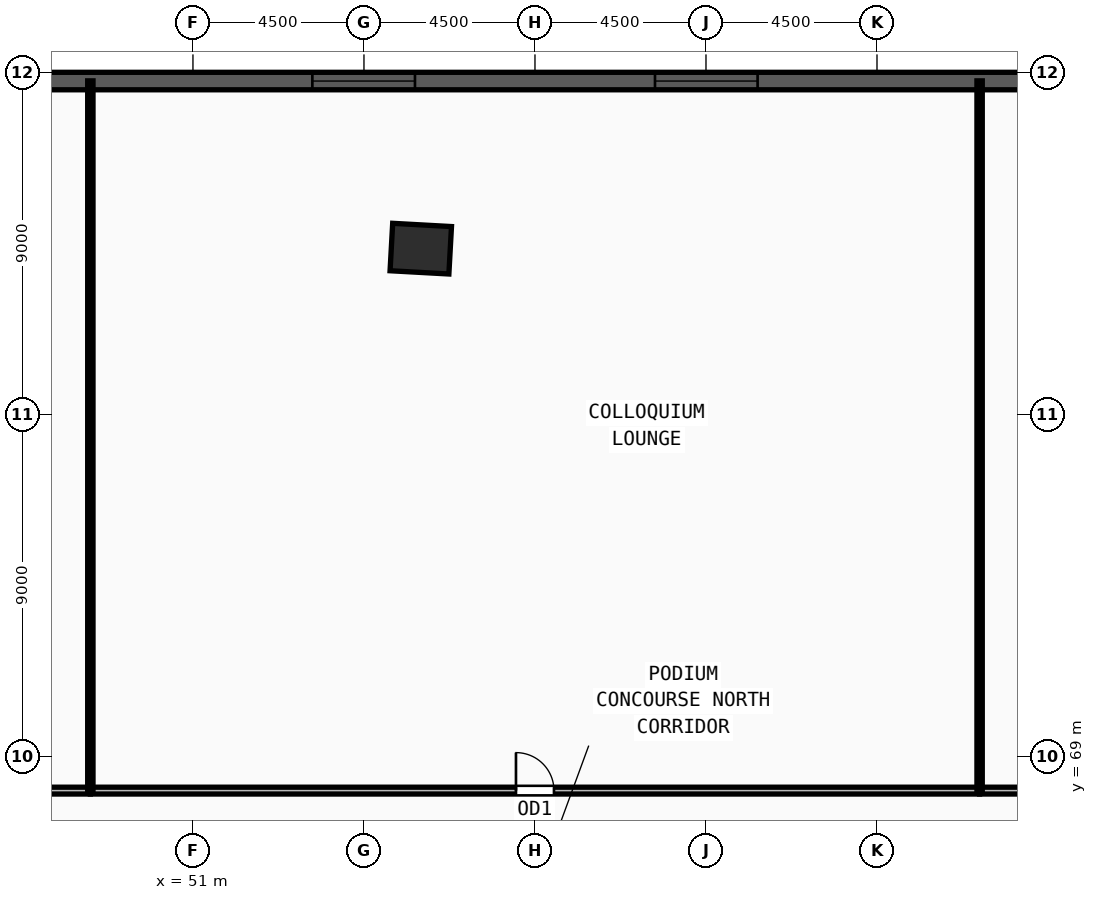
"""IFC4 building model, lengths in metres.
Left out: names, types, materials, properties, quantities, classifications, styles, units other than length and angle.
Written with IfcOpenShell. Run it as: python <this file> out.ifc"""

import sys

from ifc_helpers import new_model, si_unit, direction, frame, frame_2d, origin, origin_2d, place, context, subcontext, project, spatial, rectangle, extrude, source, transform, mapped, element, fill, save


model = new_model("IFC4")
c1 = context("Model", 3, precision=1e-05, world=origin(), true_north=direction((0.0, 1.0)))
c2 = subcontext(c1, "Body", "Model", "MODEL_VIEW")
j1 = project(units=[si_unit("LENGTHUNIT", "METRE"), si_unit("PLANEANGLEUNIT", "RADIAN")], contexts=[c1])
p1 = place(None, origin())
s1 = spatial("IfcSite", under=j1, at=p1, CompositionType="ELEMENT")
p2 = place(p1, origin())
s2 = spatial("IfcBuilding", under=s1, at=p2, CompositionType="ELEMENT")
p3 = place(p2, frame((0.0, 0.0, 14.4)))
s3 = spatial("IfcBuildingStorey", under=s2, at=p3, CompositionType="ELEMENT", Elevation=14.4)
m1 = source(origin(), c2, "Body", "SweptSolid", [
    extrude(rectangle(XDim=1.55, YDim=1.25, at=origin_2d()), origin(), (0.0, 0.0, 1.0), 4.5),
])
p4 = place(p3, frame((56.995, 82.36, 0.0), z_axis=(0.0, 0.0, 1.0), x_axis=(-0.998479491627, 0.055124448298, 0.0)))
e1 = element("IfcColumn", 1, at=p4, inside=s3, PredefinedType="COLUMN", context=c2, shape_type="MappedRepresentation", body=[
    mapped(m1, transform((0.0, 0.0, 0.0), x_axis=(1.0, 0.0, 0.0), y_axis=(0.0, 1.0, 0.0), z_axis=(0.0, 0.0, 1.0), scale=1.0)),
])
p5 = place(p3, frame((100.57, 86.77, 0.0), z_axis=(0.0, 0.0, 1.0), x_axis=(-1.0, 0.0, 0.0)))
e2 = element("IfcWall", 2, at=p5, inside=s3, PredefinedType="SOLIDWALL", context=c2, shape_type="SweptSolid", body=[
    extrude(rectangle(XDim=81.14, YDim=0.46, at=frame_2d((40.57, 0.0))), origin(), (0.0, 0.0, 1.0), 4.25),
])
m2 = source(origin(), c2, "Body", "SweptSolid", [
    extrude(rectangle(XDim=2.7, YDim=2.35, at=frame_2d((1.35, 1.175))), frame((0.0, 0.24, 0.0), z_axis=(0.0, -1.0, 0.0), x_axis=(1.0, 0.0, 0.0)), (0.0, 0.0, 1.0), 0.48),
])
p6 = place(p5, frame((7.666, 0.0, 0.55)))
e3 = element("IfcOpeningElement", 3, at=p6, cuts=e2, PredefinedType="OPENING", context=c2, shape_type="MappedRepresentation", body=[
    mapped(m2, transform((0.0, 0.0, 0.0), x_axis=(1.0, 0.0, 0.0), y_axis=(0.0, 1.0, 0.0), z_axis=(0.0, 0.0, 1.0), scale=1.0)),
])
p7 = place(p5, frame((16.681, 0.0, 0.55)))
e4 = element("IfcOpeningElement", 4, at=p7, cuts=e2, PredefinedType="OPENING", context=c2, shape_type="MappedRepresentation", body=[
    mapped(m2, transform((0.0, 0.0, 0.0), x_axis=(1.0, 0.0, 0.0), y_axis=(0.0, 1.0, 0.0), z_axis=(0.0, 0.0, 1.0), scale=1.0)),
])
p8 = place(p5, frame((34.712, 0.0, 0.55)))
e5 = element("IfcOpeningElement", 5, at=p8, cuts=e2, PredefinedType="OPENING", context=c2, shape_type="MappedRepresentation", body=[
    mapped(m2, transform((0.0, 0.0, 0.0), x_axis=(1.0, 0.0, 0.0), y_axis=(0.0, 1.0, 0.0), z_axis=(0.0, 0.0, 1.0), scale=1.0)),
])
p9 = place(p5, frame((43.728, 0.0, 0.55)))
e6 = element("IfcOpeningElement", 6, at=p9, cuts=e2, PredefinedType="OPENING", context=c2, shape_type="MappedRepresentation", body=[
    mapped(m2, transform((0.0, 0.0, 0.0), x_axis=(1.0, 0.0, 0.0), y_axis=(0.0, 1.0, 0.0), z_axis=(0.0, 0.0, 1.0), scale=1.0)),
])
p10 = place(p5, frame((61.759, 0.0, 0.55)))
e7 = element("IfcOpeningElement", 7, at=p10, cuts=e2, PredefinedType="OPENING", context=c2, shape_type="MappedRepresentation", body=[
    mapped(m2, transform((0.0, 0.0, 0.0), x_axis=(1.0, 0.0, 0.0), y_axis=(0.0, 1.0, 0.0), z_axis=(0.0, 0.0, 1.0), scale=1.0)),
])
p11 = place(p5, frame((70.774, 0.0, 0.55)))
e8 = element("IfcOpeningElement", 8, at=p11, cuts=e2, PredefinedType="OPENING", context=c2, shape_type="MappedRepresentation", body=[
    mapped(m2, transform((0.0, 0.0, 0.0), x_axis=(1.0, 0.0, 0.0), y_axis=(0.0, 1.0, 0.0), z_axis=(0.0, 0.0, 1.0), scale=1.0)),
])
p12 = place(p3, frame((48.3, 68.1, 0.0), z_axis=(0.0, 0.0, 1.0), x_axis=(1.0, 0.0, 0.0)))
e9 = element("IfcWall", 9, at=p12, inside=s3, PredefinedType="PARTITIONING", context=c2, shape_type="SweptSolid", body=[
    extrude(rectangle(XDim=23.4, YDim=0.18, at=frame_2d((11.7, 0.0))), origin(), (0.0, 0.0, 1.0), 4.25),
])
m3 = source(origin(), c2, "Body", "SweptSolid", [
    extrude(rectangle(XDim=1.0, YDim=2.2, at=frame_2d((0.5, 1.1))), frame((0.0, 0.1, 0.0), z_axis=(0.0, -1.0, 0.0), x_axis=(1.0, 0.0, 0.0)), (0.0, 0.0, 1.0), 0.2),
])
p13 = place(p12, frame((11.2, 0.0, 0.0)))
e10 = element("IfcOpeningElement", 10, at=p13, cuts=e9, PredefinedType="OPENING", context=c2, shape_type="MappedRepresentation", body=[
    mapped(m3, transform((0.0, 0.0, 0.0), x_axis=(1.0, 0.0, 0.0), y_axis=(0.0, 1.0, 0.0), z_axis=(0.0, 0.0, 1.0), scale=1.0)),
])
for number, where, z_axis, x_axis in (
    (11, (44.42, 68.1, 0.0), (0.0, 0.0, 1.0), (1.0, 0.0, 0.0)),
    (12, (71.7, 68.1, 0.0), (0.0, 0.0, 1.0), (1.0, 0.0, 0.0)),
):
    element("IfcWall", number, at=place(p3, frame(where, z_axis=z_axis, x_axis=x_axis)), inside=s3, PredefinedType="PARTITIONING", context=c2, shape_type="SweptSolid", body=[
        extrude(rectangle(XDim=3.88, YDim=0.18, at=frame_2d((1.94, 0.0))), origin(), (0.0, 0.0, 1.0), 4.25),
    ])
for number, where, z_axis, x_axis in (
    (13, (48.3, 68.1, 0.0), (0.0, 0.0, 1.0), (0.0, 1.0, 0.0)),
    (14, (71.7, 68.1, 0.0), (0.0, 0.0, 1.0), (0.0, 1.0, 0.0)),
):
    element("IfcWall", number, at=place(p3, frame(where, z_axis=z_axis, x_axis=x_axis)), inside=s3, PredefinedType="PARTITIONING", context=c2, shape_type="SweptSolid", body=[
        extrude(rectangle(XDim=18.675, YDim=0.14, at=frame_2d((9.337, 0.0))), origin(), (0.0, 0.0, 1.0), 4.25),
    ])
m4 = source(origin(), c2, "Body", "SweptSolid", [
    extrude(rectangle(XDim=2.7, YDim=2.35, at=frame_2d((1.35, 1.175))), frame((0.0, 0.03, 0.0), z_axis=(0.0, -1.0, 0.0), x_axis=(1.0, 0.0, 0.0)), (0.0, 0.0, 1.0), 0.06),
])
p14 = place(p8, origin())
e15 = element("IfcWindow", 15, at=p14, inside=s3, PartitioningType="TRIPLE_PANEL_VERTICAL", PredefinedType="WINDOW", context=c2, shape_type="MappedRepresentation", body=[
    mapped(m4, transform((0.0, 0.0, 0.0), x_axis=(1.0, 0.0, 0.0), y_axis=(0.0, 1.0, 0.0), z_axis=(0.0, 0.0, 1.0), scale=1.0)),
])
fill(e5, e15)
p15 = place(p9, origin())
e16 = element("IfcWindow", 16, at=p15, inside=s3, PartitioningType="TRIPLE_PANEL_VERTICAL", PredefinedType="WINDOW", context=c2, shape_type="MappedRepresentation", body=[
    mapped(m4, transform((0.0, 0.0, 0.0), x_axis=(1.0, 0.0, 0.0), y_axis=(0.0, 1.0, 0.0), z_axis=(0.0, 0.0, 1.0), scale=1.0)),
])
fill(e6, e16)
m5 = source(origin(), c2, "Body", "SweptSolid", [
    extrude(rectangle(XDim=1.0, YDim=2.2, at=frame_2d((0.5, 1.1))), frame((0.0, 0.025, 0.0), z_axis=(0.0, -1.0, 0.0), x_axis=(1.0, 0.0, 0.0)), (0.0, 0.0, 1.0), 0.05),
])
p16 = place(p13, origin())
e17 = element("IfcDoor", 17, at=p16, inside=s3, OperationType="SINGLE_SWING_LEFT", PredefinedType="DOOR", context=c2, shape_type="MappedRepresentation", body=[
    mapped(m5, transform((0.0, 0.0, 0.0), x_axis=(1.0, 0.0, 0.0), y_axis=(0.0, 1.0, 0.0), z_axis=(0.0, 0.0, 1.0), scale=1.0)),
])
fill(e10, e17)
save(model, sys.argv[1])
